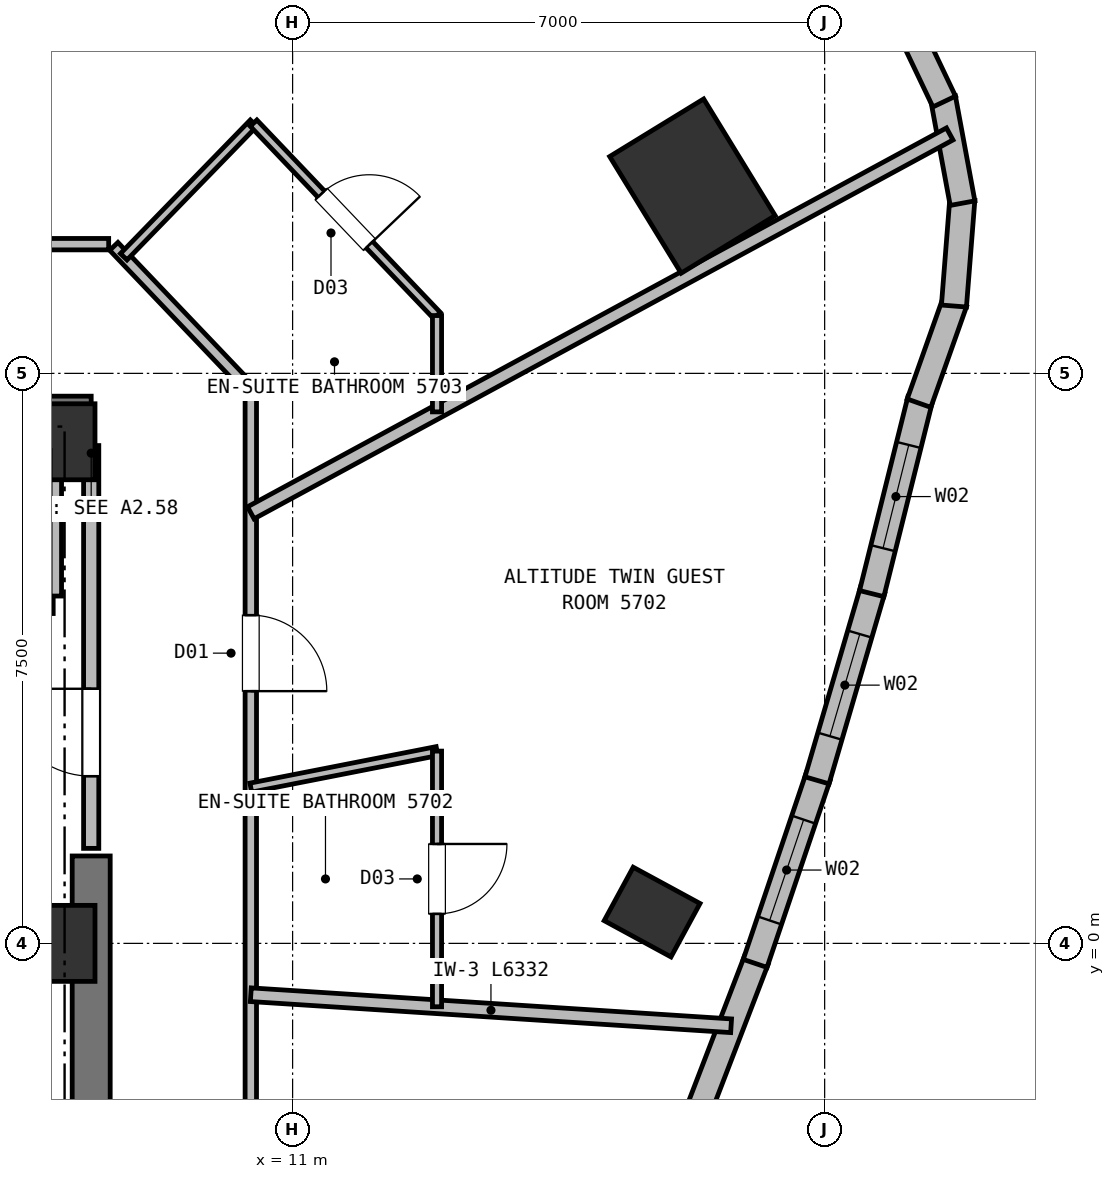
"""IFC4 building model, lengths in metres.
Left out: names, types, materials, properties, quantities, classifications, styles, units other than length and angle.
Written with IfcOpenShell. Run it as: python <this file> out.ifc"""

import sys

from ifc_helpers import new_model, si_unit, direction, frame, frame_2d, origin, origin_2d, place, context, subcontext, project, spatial, rectangle, extrude, element, fill, save


model = new_model("IFC4")
c1 = context("Model", 3, precision=1e-05, world=origin(), true_north=direction((0.0, 1.0)))
c2 = subcontext(c1, "Body", "Model", "MODEL_VIEW")
j1 = project(units=[si_unit("LENGTHUNIT", "METRE"), si_unit("PLANEANGLEUNIT", "RADIAN")], contexts=[c1])
p1 = place(None, origin())
s1 = spatial("IfcSite", under=j1, at=p1, CompositionType="ELEMENT")
p2 = place(p1, origin())
s2 = spatial("IfcBuilding", under=s1, at=p2, CompositionType="ELEMENT")
p3 = place(p2, frame((0.0, 0.0, 216.95)))
s3 = spatial("IfcBuildingStorey", under=s2, at=p3, CompositionType="ELEMENT", Elevation=216.95)
for number, where, z_axis, x_axis in (
    (1, (8.0, 0.0, 0.0), (0.0, 0.0, 1.0), (1.0, 0.0, 0.0)),
    (2, (8.0, 6.6, 0.0), (0.0, 0.0, 1.0), (1.0, 0.0, 0.0)),
):
    element("IfcColumn", number, at=place(p3, frame(where, z_axis=z_axis, x_axis=x_axis)), inside=s3, PredefinedType="COLUMN", context=c2, shape_type="SweptSolid", body=[
        extrude(rectangle(XDim=0.8, YDim=1.0, at=origin_2d()), origin(), (0.0, 0.0, 1.0), 3.8),
    ])
p4 = place(p3, frame((-8.35, 6.95, 0.0), z_axis=(0.0, 0.0, 1.0), x_axis=(1.0, 0.0, 0.0)))
e3 = element("IfcWall", 3, at=p4, inside=s3, PredefinedType="SHEAR", context=c2, shape_type="SweptSolid", body=[
    extrude(rectangle(XDim=16.7, YDim=0.5, at=frame_2d((8.35, 0.0))), origin(), (0.0, 0.0, 1.0), 3.55),
])
p5 = place(p3, frame((8.35, -6.95, 0.0), z_axis=(0.0, 0.0, 1.0), x_axis=(0.0, 1.0, 0.0)))
e4 = element("IfcWall", 4, at=p5, inside=s3, PredefinedType="SHEAR", context=c2, shape_type="SweptSolid", body=[
    extrude(rectangle(XDim=8.1, YDim=0.5, at=frame_2d((4.05, 0.0))), origin(), (0.0, 0.0, 1.0), 3.55),
])
p6 = place(p3, frame((15.73, 0.412, 0.0), z_axis=(0.0, 0.0, 1.0), x_axis=(0.47715876026, 0.878817112662, 0.0)))
e5 = element("IfcColumn", 5, at=p6, inside=s3, PredefinedType="COLUMN", context=c2, shape_type="SweptSolid", body=[
    extrude(rectangle(XDim=0.8, YDim=1.0, at=origin_2d()), origin(), (0.0, 0.0, 1.0), 3.8),
])
p7 = place(p3, frame((16.26, 9.964, 0.0), z_axis=(0.0, 0.0, 1.0), x_axis=(0.852640164354, 0.522498564716, 0.0)))
e6 = element("IfcColumn", 6, at=p7, inside=s3, PredefinedType="COLUMN", context=c2, shape_type="SweptSolid", body=[
    extrude(rectangle(XDim=1.45, YDim=1.8, at=origin_2d()), origin(), (0.0, 0.0, 1.0), 3.8),
])
p8 = place(p3, frame((17.102, -0.216, 0.0), z_axis=(0.0, 0.0, 1.0), x_axis=(-0.358528725074, -0.933518694669, 0.0)))
e7 = element("IfcWall", 7, at=p8, inside=s3, PredefinedType="SOLIDWALL", context=c2, shape_type="SweptSolid", body=[
    extrude(rectangle(XDim=2.579, YDim=0.33, at=frame_2d((1.29, 0.0))), origin(), (0.0, 0.0, 1.0), 3.55),
])
p9 = place(p3, frame((17.914, 2.193, 0.0), z_axis=(0.0, 0.0, 1.0), x_axis=(-0.319700444906, -0.94751866764, 0.0)))
e8 = element("IfcWall", 8, at=p9, inside=s3, PredefinedType="SOLIDWALL", context=c2, shape_type="SweptSolid", body=[
    extrude(rectangle(XDim=2.593, YDim=0.33, at=frame_2d((1.296, 0.0))), origin(), (0.0, 0.0, 1.0), 3.55),
])
p10 = place(p9, frame((0.596, 0.0, 0.72)))
e9 = element("IfcOpeningElement", 9, at=p10, cuts=e8, PredefinedType="OPENING", context=c2, shape_type="SweptSolid", body=[
    extrude(rectangle(XDim=1.4, YDim=1.84, at=frame_2d((0.7, 0.92))), frame((0.0, 0.175, 0.0), z_axis=(0.0, -1.0, 0.0), x_axis=(1.0, 0.0, 0.0)), (0.0, 0.0, 1.0), 0.35),
])
p11 = place(p3, frame((18.632, 4.65, 0.0), z_axis=(0.0, 0.0, 1.0), x_axis=(-0.280732723443, -0.959785985514, 0.0)))
e10 = element("IfcWall", 10, at=p11, inside=s3, PredefinedType="SOLIDWALL", context=c2, shape_type="SweptSolid", body=[
    extrude(rectangle(XDim=2.61, YDim=0.33, at=frame_2d((1.305, 0.0))), origin(), (0.0, 0.0, 1.0), 3.55),
])
p12 = place(p11, frame((0.605, 0.0, 0.72)))
e11 = element("IfcOpeningElement", 11, at=p12, cuts=e10, PredefinedType="OPENING", context=c2, shape_type="SweptSolid", body=[
    extrude(rectangle(XDim=1.4, YDim=1.84, at=frame_2d((0.7, 0.92))), frame((0.0, 0.175, 0.0), z_axis=(0.0, -1.0, 0.0), x_axis=(1.0, 0.0, 0.0)), (0.0, 0.0, 1.0), 0.35),
])
p13 = place(p3, frame((19.256, 7.156, 0.0), z_axis=(0.0, 0.0, 1.0), x_axis=(-0.24192443615, -0.970295092842, 0.0)))
e12 = element("IfcWall", 12, at=p13, inside=s3, PredefinedType="SOLIDWALL", context=c2, shape_type="SweptSolid", body=[
    extrude(rectangle(XDim=2.632, YDim=0.33, at=frame_2d((1.316, 0.0))), origin(), (0.0, 0.0, 1.0), 3.55),
])
p14 = place(p13, frame((0.616, 0.0, 0.72)))
e13 = element("IfcOpeningElement", 13, at=p14, cuts=e12, PredefinedType="OPENING", context=c2, shape_type="SweptSolid", body=[
    extrude(rectangle(XDim=1.4, YDim=1.84, at=frame_2d((0.7, 0.92))), frame((0.0, 0.175, 0.0), z_axis=(0.0, -1.0, 0.0), x_axis=(1.0, 0.0, 0.0)), (0.0, 0.0, 1.0), 0.35),
])
p15 = place(p3, frame((19.711, 8.435, 0.0), z_axis=(0.0, 0.0, 1.0), x_axis=(-0.33376364871, -0.942656791627, 0.0)))
e14 = element("IfcWall", 14, at=p15, inside=s3, PredefinedType="SOLIDWALL", context=c2, shape_type="SweptSolid", body=[
    extrude(rectangle(XDim=1.407, YDim=0.33, at=frame_2d((0.704, 0.0))), origin(), (0.0, 0.0, 1.0), 3.55),
])
p16 = place(p3, frame((19.812, 9.789, 0.0), z_axis=(0.0, 0.0, 1.0), x_axis=(-0.078566409812, -0.99690888212, 0.0)))
e15 = element("IfcWall", 15, at=p16, inside=s3, PredefinedType="SOLIDWALL", context=c2, shape_type="SweptSolid", body=[
    extrude(rectangle(XDim=1.408, YDim=0.33, at=frame_2d((0.704, 0.0))), origin(), (0.0, 0.0, 1.0), 3.55),
])
for number, where, z_axis, x_axis in (
    (16, (19.558, 11.124, 0.0), (0.0, 0.0, 1.0), (0.182, -0.983, 0.0)),
    (17, (18.967, 12.347, 0.0), (0.0, 0.0, 1.0), (0.431, -0.902, 0.0)),
):
    element("IfcWall", number, at=place(p3, frame(where, z_axis=z_axis, x_axis=x_axis)), inside=s3, PredefinedType="SOLIDWALL", context=c2, shape_type="SweptSolid", body=[
        extrude(rectangle(XDim=1.407, YDim=0.33, at=frame_2d((0.704, 0.0))), origin(), (0.0, 0.0, 1.0), 3.55),
    ])
p17 = place(p3, frame((5.35, 4.45, 0.0), z_axis=(0.0, 0.0, 1.0), x_axis=(1.0, 0.0, 0.0)))
e18 = element("IfcWall", 18, at=p17, inside=s3, PredefinedType="PARTITIONING", context=c2, shape_type="SweptSolid", body=[
    extrude(rectangle(XDim=2.5, YDim=0.22, at=frame_2d((1.25, 0.0))), origin(), (0.0, 0.0, 1.0), 3.55),
])
p18 = place(p17, frame((0.66, 0.0, 0.0)))
e19 = element("IfcOpeningElement", 19, at=p18, cuts=e18, PredefinedType="OPENING", context=c2, shape_type="SweptSolid", body=[
    extrude(rectangle(XDim=1.18, YDim=2.15, at=frame_2d((0.59, 1.075))), frame((0.0, 0.12, 0.0), z_axis=(0.0, -1.0, 0.0), x_axis=(1.0, 0.0, 0.0)), (0.0, 0.0, 1.0), 0.24),
])
p19 = place(p3, frame((7.85, 4.57, 0.0), z_axis=(0.0, 0.0, 1.0), x_axis=(0.0, 1.0, 0.0)))
e20 = element("IfcWall", 20, at=p19, inside=s3, PredefinedType="PARTITIONING", context=c2, shape_type="SweptSolid", body=[
    extrude(rectangle(XDim=2.13, YDim=0.22, at=frame_2d((1.065, 0.0))), origin(), (0.0, 0.0, 1.0), 3.18),
])
p20 = place(p3, frame((8.35, 1.25, 0.0), z_axis=(0.0, 0.0, 1.0), x_axis=(0.0, 1.0, 0.0)))
e21 = element("IfcWall", 21, at=p20, inside=s3, PredefinedType="PARTITIONING", context=c2, shape_type="SweptSolid", body=[
    extrude(rectangle(XDim=5.3, YDim=0.2, at=frame_2d((2.65, 0.0))), origin(), (0.0, 0.0, 1.0), 3.55),
])
p21 = place(p20, frame((0.95, 0.0, 0.0)))
e22 = element("IfcOpeningElement", 22, at=p21, cuts=e21, PredefinedType="OPENING", context=c2, shape_type="SweptSolid", body=[
    extrude(rectangle(XDim=1.15, YDim=2.15, at=frame_2d((0.575, 1.075))), frame((0.0, 0.11, 0.0), z_axis=(0.0, -1.0, 0.0), x_axis=(1.0, 0.0, 0.0)), (0.0, 0.0, 1.0), 0.22),
])
p22 = place(p3, frame((10.45, 7.24, 0.0), z_axis=(0.0, 0.0, 1.0), x_axis=(0.0, -1.0, 0.0)))
e23 = element("IfcWall", 23, at=p22, inside=s3, PredefinedType="PARTITIONING", context=c2, shape_type="SweptSolid", body=[
    extrude(rectangle(XDim=14.48, YDim=0.15, at=frame_2d((7.24, 0.0))), origin(), (0.0, 0.0, 1.0), 3.55),
])
p23 = place(p22, frame((9.459, 0.0, 0.0)))
e24 = element("IfcOpeningElement", 24, at=p23, cuts=e23, PredefinedType="OPENING", context=c2, shape_type="SweptSolid", body=[
    extrude(rectangle(XDim=1.0, YDim=2.15, at=frame_2d((0.5, 1.075))), frame((0.0, 0.085, 0.0), z_axis=(0.0, -1.0, 0.0), x_axis=(1.0, 0.0, 0.0)), (0.0, 0.0, 1.0), 0.17),
])
p24 = place(p22, frame((2.921, 0.0, 0.0)))
e25 = element("IfcOpeningElement", 25, at=p24, cuts=e23, PredefinedType="OPENING", context=c2, shape_type="SweptSolid", body=[
    extrude(rectangle(XDim=1.0, YDim=2.15, at=frame_2d((0.5, 1.075))), frame((0.0, 0.085, 0.0), z_axis=(0.0, -1.0, 0.0), x_axis=(1.0, 0.0, 0.0)), (0.0, 0.0, 1.0), 0.17),
])
p25 = place(p3, frame((8.648, 9.171, 0.0), z_axis=(0.0, 0.0, 1.0), x_axis=(0.689960858356, -0.723846678473, 0.0)))
e26 = element("IfcWall", 26, at=p25, inside=s3, PredefinedType="PARTITIONING", context=c2, shape_type="SweptSolid", body=[
    extrude(rectangle(XDim=2.572, YDim=0.15, at=frame_2d((1.286, 0.0))), origin(), (0.0, 0.0, 1.0), 3.55),
])
p26 = place(p3, frame((-8.58, 9.2, 0.0), z_axis=(0.0, 0.0, 1.0), x_axis=(1.0, 0.0, 0.0)))
e27 = element("IfcWall", 27, at=p26, inside=s3, PredefinedType="PARTITIONING", context=c2, shape_type="SweptSolid", body=[
    extrude(rectangle(XDim=17.16, YDim=0.15, at=frame_2d((8.58, 0.0))), origin(), (0.0, 0.0, 1.0), 3.55),
])
p27 = place(p26, frame((7.52, 0.0, 0.0)))
e28 = element("IfcOpeningElement", 28, at=p27, cuts=e27, PredefinedType="OPENING", context=c2, shape_type="SweptSolid", body=[
    extrude(rectangle(XDim=1.0, YDim=2.15, at=frame_2d((0.5, 1.075))), frame((0.0, 0.085, 0.0), z_axis=(0.0, -1.0, 0.0), x_axis=(1.0, 0.0, 0.0)), (0.0, 0.0, 1.0), 0.17),
])
p28 = place(p26, frame((14.319, 0.0, 0.0)))
e29 = element("IfcOpeningElement", 29, at=p28, cuts=e27, PredefinedType="OPENING", context=c2, shape_type="SweptSolid", body=[
    extrude(rectangle(XDim=1.06, YDim=2.15, at=frame_2d((0.53, 1.075))), frame((0.0, 0.085, 0.0), z_axis=(0.0, -1.0, 0.0), x_axis=(1.0, 0.0, 0.0)), (0.0, 0.0, 1.0), 0.17),
])
p29 = place(p3, frame((10.45, -0.676, 0.0), z_axis=(0.0, 0.0, 1.0), x_axis=(0.997917550795, -0.064502417126, 0.0)))
e30 = element("IfcWall", 30, at=p29, inside=s3, PredefinedType="PARTITIONING", context=c2, shape_type="SweptSolid", body=[
    extrude(rectangle(XDim=6.332, YDim=0.18, at=frame_2d((3.166, 0.0))), origin(), (0.0, 0.0, 1.0), 3.55),
])
p30 = place(p3, frame((10.45, 2.049, 0.0), z_axis=(0.0, 0.0, 1.0), x_axis=(0.981307232297, 0.192447696379, 0.0)))
e31 = element("IfcWall", 31, at=p30, inside=s3, PredefinedType="PARTITIONING", context=c2, shape_type="SweptSolid", body=[
    extrude(rectangle(XDim=2.497, YDim=0.12, at=frame_2d((1.248, 0.0))), origin(), (0.0, 0.0, 1.0), 3.55),
])
p31 = place(p3, frame((12.9, 2.53, 0.0), z_axis=(0.0, 0.0, 1.0), x_axis=(0.0, -1.0, 0.0)))
e32 = element("IfcWall", 32, at=p31, inside=s3, PredefinedType="PARTITIONING", context=c2, shape_type="SweptSolid", body=[
    extrude(rectangle(XDim=3.364, YDim=0.12, at=frame_2d((1.682, 0.0))), origin(), (0.0, 0.0, 1.0), 3.55),
])
p32 = place(p31, frame((1.222, 0.0, 0.0)))
e33 = element("IfcOpeningElement", 33, at=p32, cuts=e32, PredefinedType="OPENING", context=c2, shape_type="SweptSolid", body=[
    extrude(rectangle(XDim=0.92, YDim=2.1, at=frame_2d((0.46, 1.05))), frame((0.0, 0.07, 0.0), z_axis=(0.0, -1.0, 0.0), x_axis=(1.0, 0.0, 0.0)), (0.0, 0.0, 1.0), 0.14),
])
p33 = place(p3, frame((10.45, 5.665, 0.0), z_axis=(0.0, 0.0, 1.0), x_axis=(0.879128995533, 0.476583895252, 0.0)))
e34 = element("IfcWall", 34, at=p33, inside=s3, PredefinedType="PARTITIONING", context=c2, shape_type="SweptSolid", body=[
    extrude(rectangle(XDim=10.459, YDim=0.18, at=frame_2d((5.23, 0.0))), origin(), (0.0, 0.0, 1.0), 3.55),
])
p34 = place(p3, frame((10.487, 10.792, 0.0), z_axis=(0.0, 0.0, 1.0), x_axis=(-0.696876436114, -0.717191210759, 0.0)))
e35 = element("IfcWall", 35, at=p34, inside=s3, PredefinedType="PARTITIONING", context=c2, shape_type="SweptSolid", body=[
    extrude(rectangle(XDim=2.452, YDim=0.12, at=frame_2d((1.226, 0.0))), origin(), (0.0, 0.0, 1.0), 3.55),
])
p35 = place(p3, frame((10.487, 10.792, 0.0), z_axis=(0.0, 0.0, 1.0), x_axis=(0.689942688038, -0.723863997739, 0.0)))
e36 = element("IfcWall", 36, at=p35, inside=s3, PredefinedType="PARTITIONING", context=c2, shape_type="SweptSolid", body=[
    extrude(rectangle(XDim=3.498, YDim=0.12, at=frame_2d((1.749, 0.0))), origin(), (0.0, 0.0, 1.0), 3.55),
])
p36 = place(p35, frame((1.289, 0.0, 0.0)))
e37 = element("IfcOpeningElement", 37, at=p36, cuts=e36, PredefinedType="OPENING", context=c2, shape_type="SweptSolid", body=[
    extrude(rectangle(XDim=0.92, YDim=2.1, at=frame_2d((0.46, 1.05))), frame((0.0, 0.07, 0.0), z_axis=(0.0, -1.0, 0.0), x_axis=(1.0, 0.0, 0.0)), (0.0, 0.0, 1.0), 0.14),
])
p37 = place(p3, frame((12.9, 6.993, 0.0), z_axis=(0.0, 0.0, 1.0), x_axis=(0.0, 1.0, 0.0)))
e38 = element("IfcWall", 38, at=p37, inside=s3, PredefinedType="PARTITIONING", context=c2, shape_type="SweptSolid", body=[
    extrude(rectangle(XDim=1.267, YDim=0.12, at=frame_2d((0.634, 0.0))), origin(), (0.0, 0.0, 1.0), 3.55),
])
p38 = place(p10, origin())
e39 = element("IfcWindow", 39, at=p38, inside=s3, PartitioningType="SINGLE_PANEL", PredefinedType="WINDOW", context=c2, shape_type="SweptSolid", body=[
    extrude(rectangle(XDim=1.4, YDim=1.84, at=frame_2d((0.7, 0.92))), frame((0.0, 0.03, 0.0), z_axis=(0.0, -1.0, 0.0), x_axis=(1.0, 0.0, 0.0)), (0.0, 0.0, 1.0), 0.06),
])
fill(e9, e39)
p39 = place(p12, origin())
e40 = element("IfcWindow", 40, at=p39, inside=s3, PartitioningType="SINGLE_PANEL", PredefinedType="WINDOW", context=c2, shape_type="SweptSolid", body=[
    extrude(rectangle(XDim=1.4, YDim=1.84, at=frame_2d((0.7, 0.92))), frame((0.0, 0.03, 0.0), z_axis=(0.0, -1.0, 0.0), x_axis=(1.0, 0.0, 0.0)), (0.0, 0.0, 1.0), 0.06),
])
fill(e11, e40)
p40 = place(p14, origin())
e41 = element("IfcWindow", 41, at=p40, inside=s3, PartitioningType="SINGLE_PANEL", PredefinedType="WINDOW", context=c2, shape_type="SweptSolid", body=[
    extrude(rectangle(XDim=1.4, YDim=1.84, at=frame_2d((0.7, 0.92))), frame((0.0, 0.03, 0.0), z_axis=(0.0, -1.0, 0.0), x_axis=(1.0, 0.0, 0.0)), (0.0, 0.0, 1.0), 0.06),
])
fill(e13, e41)
p41 = place(p21, origin())
e42 = element("IfcDoor", 42, at=p41, inside=s3, OperationType="SINGLE_SWING_RIGHT", PredefinedType="DOOR", context=c2, shape_type="SweptSolid", body=[
    extrude(rectangle(XDim=1.15, YDim=2.15, at=frame_2d((0.575, 1.075))), frame((0.0, 0.025, 0.0), z_axis=(0.0, -1.0, 0.0), x_axis=(1.0, 0.0, 0.0)), (0.0, 0.0, 1.0), 0.05),
])
fill(e22, e42)
p42 = place(p32, origin())
e43 = element("IfcDoor", 43, at=p42, inside=s3, OperationType="SINGLE_SWING_LEFT", PredefinedType="DOOR", context=c2, shape_type="SweptSolid", body=[
    extrude(rectangle(XDim=0.92, YDim=2.1, at=frame_2d((0.46, 1.05))), frame((0.0, 0.025, 0.0), z_axis=(0.0, -1.0, 0.0), x_axis=(1.0, 0.0, 0.0)), (0.0, 0.0, 1.0), 0.05),
])
fill(e33, e43)
p43 = place(p36, origin())
e44 = element("IfcDoor", 44, at=p43, inside=s3, OperationType="SINGLE_SWING_RIGHT", PredefinedType="DOOR", context=c2, shape_type="SweptSolid", body=[
    extrude(rectangle(XDim=0.92, YDim=2.1, at=frame_2d((0.46, 1.05))), frame((0.0, 0.025, 0.0), z_axis=(0.0, -1.0, 0.0), x_axis=(1.0, 0.0, 0.0)), (0.0, 0.0, 1.0), 0.05),
])
fill(e37, e44)
p44 = place(p24, origin())
e45 = element("IfcDoor", 45, at=p44, inside=s3, OperationType="SINGLE_SWING_RIGHT", PredefinedType="DOOR", context=c2, shape_type="SweptSolid", body=[
    extrude(rectangle(XDim=1.0, YDim=2.15, at=frame_2d((0.5, 1.075))), frame((0.0, 0.025, 0.0), z_axis=(0.0, -1.0, 0.0), x_axis=(1.0, 0.0, 0.0)), (0.0, 0.0, 1.0), 0.05),
])
fill(e25, e45)
save(model, sys.argv[1])
